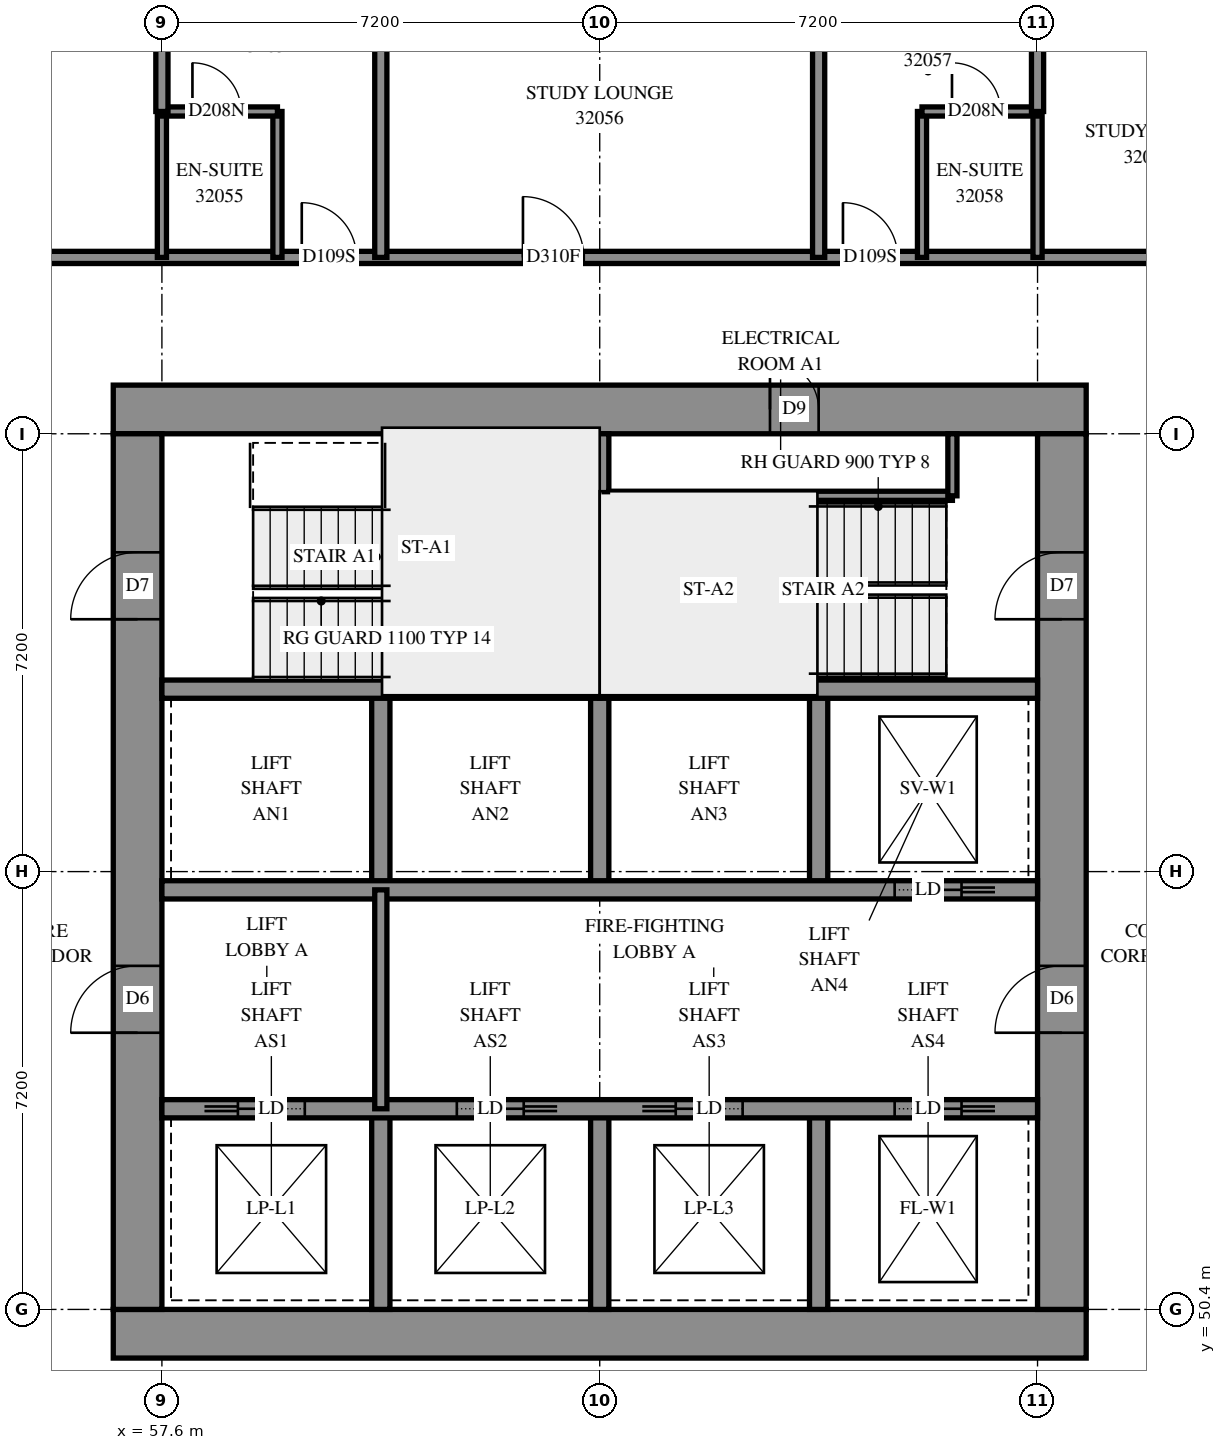
"""IFC4 building model, lengths in metres.
Left out: names, types, materials, properties, quantities, classifications, styles, units other than length and angle.
Written with IfcOpenShell. Run it as: python <this file> out.ifc"""

import sys

from ifc_helpers import new_model, si_unit, direction, frame, frame_2d, origin, place, context, subcontext, project, spatial, rectangle, extrude, element, fill, save


model = new_model("IFC4")
c1 = context("Model", 3, precision=1e-05, world=origin(), true_north=direction((0.0, 1.0)))
c2 = subcontext(c1, "Body", "Model", "MODEL_VIEW")
j1 = project(units=[si_unit("LENGTHUNIT", "METRE"), si_unit("PLANEANGLEUNIT", "RADIAN")], contexts=[c1])
p1 = place(None, origin())
s1 = spatial("IfcSite", under=j1, at=p1, CompositionType="ELEMENT")
p2 = place(p1, origin())
s2 = spatial("IfcBuilding", under=s1, at=p2, CompositionType="ELEMENT")
p3 = place(p2, frame((0.0, 0.0, 118.6)))
s3 = spatial("IfcBuildingStorey", under=s2, at=p3, CompositionType="ELEMENT", Elevation=118.6)
p4 = place(p3, frame((56.8, 50.0, -0.3), z_axis=(0.0, 0.0, 1.0), x_axis=(1.0, 0.0, 0.0)))
e1 = element("IfcWall", 1, at=p4, inside=s3, PredefinedType="SHEAR", context=c2, shape_type="SweptSolid", body=[
    extrude(rectangle(XDim=16.0, YDim=0.8, at=frame_2d((8.0, 0.0))), origin(), (0.0, 0.0, 1.0), 2.7),
])
p5 = place(p3, frame((56.8, 65.2, -0.3), z_axis=(0.0, 0.0, 1.0), x_axis=(1.0, 0.0, 0.0)))
e2 = element("IfcWall", 2, at=p5, inside=s3, PredefinedType="SHEAR", context=c2, shape_type="SweptSolid", body=[
    extrude(rectangle(XDim=16.0, YDim=0.8, at=frame_2d((8.0, 0.0))), origin(), (0.0, 0.0, 1.0), 2.7),
])
p6 = place(p5, frame((10.8, 0.0, 0.3)))
e3 = element("IfcOpeningElement", 3, at=p6, cuts=e2, PredefinedType="OPENING", context=c2, shape_type="SweptSolid", body=[
    extrude(rectangle(XDim=0.8, YDim=2.1, at=frame_2d((0.4, 1.05))), frame((0.0, 0.41, 0.0), z_axis=(0.0, -1.0, 0.0), x_axis=(1.0, 0.0, 0.0)), (0.0, 0.0, 1.0), 0.82),
])
p7 = place(p3, frame((57.2, 50.4, -0.3), z_axis=(0.0, 0.0, 1.0), x_axis=(0.0, 1.0, 0.0)))
e4 = element("IfcWall", 4, at=p7, inside=s3, PredefinedType="SHEAR", context=c2, shape_type="SweptSolid", body=[
    extrude(rectangle(XDim=14.4, YDim=0.8, at=frame_2d((7.2, 0.0))), origin(), (0.0, 0.0, 1.0), 2.7),
])
p8 = place(p7, frame((4.55, 0.0, 0.3)))
e5 = element("IfcOpeningElement", 5, at=p8, cuts=e4, PredefinedType="OPENING", context=c2, shape_type="SweptSolid", body=[
    extrude(rectangle(XDim=1.1, YDim=2.1, at=frame_2d((0.55, 1.05))), frame((0.0, 0.41, 0.0), z_axis=(0.0, -1.0, 0.0), x_axis=(1.0, 0.0, 0.0)), (0.0, 0.0, 1.0), 0.82),
])
p9 = place(p7, frame((11.35, 0.0, 0.3)))
e6 = element("IfcOpeningElement", 6, at=p9, cuts=e4, PredefinedType="OPENING", context=c2, shape_type="SweptSolid", body=[
    extrude(rectangle(XDim=1.1, YDim=2.1, at=frame_2d((0.55, 1.05))), frame((0.0, 0.41, 0.0), z_axis=(0.0, -1.0, 0.0), x_axis=(1.0, 0.0, 0.0)), (0.0, 0.0, 1.0), 0.82),
])
p10 = place(p3, frame((72.4, 50.4, -0.3), z_axis=(0.0, 0.0, 1.0), x_axis=(0.0, 1.0, 0.0)))
e7 = element("IfcWall", 7, at=p10, inside=s3, PredefinedType="SHEAR", context=c2, shape_type="SweptSolid", body=[
    extrude(rectangle(XDim=14.4, YDim=0.8, at=frame_2d((7.2, 0.0))), origin(), (0.0, 0.0, 1.0), 2.7),
])
p11 = place(p10, frame((4.55, 0.0, 0.3)))
e8 = element("IfcOpeningElement", 8, at=p11, cuts=e7, PredefinedType="OPENING", context=c2, shape_type="SweptSolid", body=[
    extrude(rectangle(XDim=1.1, YDim=2.1, at=frame_2d((0.55, 1.05))), frame((0.0, 0.41, 0.0), z_axis=(0.0, -1.0, 0.0), x_axis=(1.0, 0.0, 0.0)), (0.0, 0.0, 1.0), 0.82),
])
p12 = place(p10, frame((11.35, 0.0, 0.3)))
e9 = element("IfcOpeningElement", 9, at=p12, cuts=e7, PredefinedType="OPENING", context=c2, shape_type="SweptSolid", body=[
    extrude(rectangle(XDim=1.1, YDim=2.1, at=frame_2d((0.55, 1.05))), frame((0.0, 0.41, 0.0), z_axis=(0.0, -1.0, 0.0), x_axis=(1.0, 0.0, 0.0)), (0.0, 0.0, 1.0), 0.82),
])
for number, where, z_axis, x_axis in (
    (10, (61.2, 50.4, 0.0), (0.0, 0.0, 1.0), (0.0, 1.0, 0.0)),
    (11, (61.2, 57.3, 0.0), (0.0, 0.0, 1.0), (0.0, 1.0, 0.0)),
    (12, (64.8, 50.4, 0.0), (0.0, 0.0, 1.0), (0.0, 1.0, 0.0)),
    (13, (64.8, 57.3, 0.0), (0.0, 0.0, 1.0), (0.0, 1.0, 0.0)),
    (14, (68.4, 50.4, 0.0), (0.0, 0.0, 1.0), (0.0, 1.0, 0.0)),
    (15, (68.4, 57.3, 0.0), (0.0, 0.0, 1.0), (0.0, 1.0, 0.0)),
):
    element("IfcWall", number, at=place(p3, frame(where, z_axis=z_axis, x_axis=x_axis)), inside=s3, PredefinedType="SOLIDWALL", context=c2, shape_type="SweptSolid", body=[
        extrude(rectangle(XDim=3.3, YDim=0.3, at=frame_2d((1.65, 0.0))), origin(), (0.0, 0.0, 1.0), 3.1),
    ])
p13 = place(p3, frame((57.6, 53.7, 0.0), z_axis=(0.0, 0.0, 1.0), x_axis=(1.0, 0.0, 0.0)))
e16 = element("IfcWall", 16, at=p13, inside=s3, PredefinedType="SOLIDWALL", context=c2, shape_type="SweptSolid", body=[
    extrude(rectangle(XDim=14.4, YDim=0.3, at=frame_2d((7.2, 0.0))), origin(), (0.0, 0.0, 1.0), 3.1),
])
p14 = place(p13, frame((1.25, 0.0, 0.0)))
e17 = element("IfcOpeningElement", 17, at=p14, cuts=e16, PredefinedType="OPENING", context=c2, shape_type="SweptSolid", body=[
    extrude(rectangle(XDim=1.1, YDim=2.1, at=frame_2d((0.55, 1.05))), frame((0.0, 0.16, 0.0), z_axis=(0.0, -1.0, 0.0), x_axis=(1.0, 0.0, 0.0)), (0.0, 0.0, 1.0), 0.32),
])
p15 = place(p13, frame((4.85, 0.0, 0.0)))
e18 = element("IfcOpeningElement", 18, at=p15, cuts=e16, PredefinedType="OPENING", context=c2, shape_type="SweptSolid", body=[
    extrude(rectangle(XDim=1.1, YDim=2.1, at=frame_2d((0.55, 1.05))), frame((0.0, 0.16, 0.0), z_axis=(0.0, -1.0, 0.0), x_axis=(1.0, 0.0, 0.0)), (0.0, 0.0, 1.0), 0.32),
])
p16 = place(p13, frame((8.45, 0.0, 0.0)))
e19 = element("IfcOpeningElement", 19, at=p16, cuts=e16, PredefinedType="OPENING", context=c2, shape_type="SweptSolid", body=[
    extrude(rectangle(XDim=1.1, YDim=2.1, at=frame_2d((0.55, 1.05))), frame((0.0, 0.16, 0.0), z_axis=(0.0, -1.0, 0.0), x_axis=(1.0, 0.0, 0.0)), (0.0, 0.0, 1.0), 0.32),
])
p17 = place(p13, frame((12.05, 0.0, 0.0)))
e20 = element("IfcOpeningElement", 20, at=p17, cuts=e16, PredefinedType="OPENING", context=c2, shape_type="SweptSolid", body=[
    extrude(rectangle(XDim=1.1, YDim=2.1, at=frame_2d((0.55, 1.05))), frame((0.0, 0.16, 0.0), z_axis=(0.0, -1.0, 0.0), x_axis=(1.0, 0.0, 0.0)), (0.0, 0.0, 1.0), 0.32),
])
p18 = place(p3, frame((57.6, 57.3, 0.0), z_axis=(0.0, 0.0, 1.0), x_axis=(1.0, 0.0, 0.0)))
e21 = element("IfcWall", 21, at=p18, inside=s3, PredefinedType="SOLIDWALL", context=c2, shape_type="SweptSolid", body=[
    extrude(rectangle(XDim=14.4, YDim=0.3, at=frame_2d((7.2, 0.0))), origin(), (0.0, 0.0, 1.0), 3.1),
])
p19 = place(p18, frame((12.05, 0.0, 0.0)))
e22 = element("IfcOpeningElement", 22, at=p19, cuts=e21, PredefinedType="OPENING", context=c2, shape_type="SweptSolid", body=[
    extrude(rectangle(XDim=1.1, YDim=2.1, at=frame_2d((0.55, 1.05))), frame((0.0, 0.16, 0.0), z_axis=(0.0, -1.0, 0.0), x_axis=(1.0, 0.0, 0.0)), (0.0, 0.0, 1.0), 0.32),
])
for number, where, z_axis, x_axis in (
    (23, (57.6, 60.6, 0.0), (0.0, 0.0, 1.0), (1.0, 0.0, 0.0)),
    (24, (64.8, 60.6, 0.0), (0.0, 0.0, 1.0), (1.0, 0.0, 0.0)),
):
    element("IfcWall", number, at=place(p3, frame(where, z_axis=z_axis, x_axis=x_axis)), inside=s3, PredefinedType="SOLIDWALL", context=c2, shape_type="SweptSolid", body=[
        extrude(rectangle(XDim=7.2, YDim=0.3, at=frame_2d((3.6, 0.0))), origin(), (0.0, 0.0, 1.0), 3.1),
    ])
p20 = place(p3, frame((64.8, 60.6, 0.0), z_axis=(0.0, 0.0, 1.0), x_axis=(0.0, 1.0, 0.0)))
e25 = element("IfcWall", 25, at=p20, inside=s3, PredefinedType="SOLIDWALL", context=c2, shape_type="SweptSolid", body=[
    extrude(rectangle(XDim=4.2, YDim=0.3, at=frame_2d((2.1, 0.0))), origin(), (0.0, 0.0, 1.0), 3.1),
])
p21 = place(p3, frame((64.95, 63.78, 0.0), z_axis=(0.0, 0.0, 1.0), x_axis=(1.0, 0.0, 0.0)))
e26 = element("IfcWall", 26, at=p21, inside=s3, PredefinedType="PARTITIONING", context=c2, shape_type="SweptSolid", body=[
    extrude(rectangle(XDim=5.65, YDim=0.15, at=frame_2d((2.825, 0.0))), origin(), (0.0, 0.0, 1.0), 3.1),
])
p22 = place(p3, frame((70.6, 63.78, 0.0), z_axis=(0.0, 0.0, 1.0), x_axis=(0.0, 1.0, 0.0)))
e27 = element("IfcWall", 27, at=p22, inside=s3, PredefinedType="PARTITIONING", context=c2, shape_type="SweptSolid", body=[
    extrude(rectangle(XDim=1.02, YDim=0.15, at=frame_2d((0.51, 0.0))), origin(), (0.0, 0.0, 1.0), 3.1),
])
p23 = place(p3, frame((61.2, 53.7, 0.0), z_axis=(0.0, 0.0, 1.0), x_axis=(0.0, 1.0, 0.0)))
e28 = element("IfcWall", 28, at=p23, inside=s3, PredefinedType="PARTITIONING", context=c2, shape_type="SweptSolid", body=[
    extrude(rectangle(XDim=3.6, YDim=0.2, at=frame_2d((1.8, 0.0))), origin(), (0.0, 0.0, 1.0), 3.1),
])
p24 = place(p3, frame((54.7, 67.7, 0.0), z_axis=(0.0, 0.0, 1.0), x_axis=(1.0, 0.0, 0.0)))
e29 = element("IfcWall", 29, at=p24, inside=s3, PredefinedType="PARTITIONING", context=c2, shape_type="SweptSolid", body=[
    extrude(rectangle(XDim=20.2, YDim=0.2, at=frame_2d((10.1, 0.0))), origin(), (0.0, 0.0, 1.0), 3.1),
])
p25 = place(p24, frame((5.2, 0.0, 0.0)))
e30 = element("IfcOpeningElement", 30, at=p25, cuts=e29, PredefinedType="OPENING", context=c2, shape_type="SweptSolid", body=[
    extrude(rectangle(XDim=0.9, YDim=2.1, at=frame_2d((0.45, 1.05))), frame((0.0, 0.11, 0.0), z_axis=(0.0, -1.0, 0.0), x_axis=(1.0, 0.0, 0.0)), (0.0, 0.0, 1.0), 0.22),
])
p26 = place(p24, frame((8.838, 0.0, 0.0)))
e31 = element("IfcOpeningElement", 31, at=p26, cuts=e29, PredefinedType="OPENING", context=c2, shape_type="SweptSolid", body=[
    extrude(rectangle(XDim=1.0, YDim=2.1, at=frame_2d((0.5, 1.05))), frame((0.0, 0.11, 0.0), z_axis=(0.0, -1.0, 0.0), x_axis=(1.0, 0.0, 0.0)), (0.0, 0.0, 1.0), 0.22),
])
p27 = place(p24, frame((14.1, 0.0, 0.0)))
e32 = element("IfcOpeningElement", 32, at=p27, cuts=e29, PredefinedType="OPENING", context=c2, shape_type="SweptSolid", body=[
    extrude(rectangle(XDim=0.9, YDim=2.1, at=frame_2d((0.45, 1.05))), frame((0.0, 0.11, 0.0), z_axis=(0.0, -1.0, 0.0), x_axis=(1.0, 0.0, 0.0)), (0.0, 0.0, 1.0), 0.22),
])
p28 = place(p3, frame((68.4, 67.7, 0.0), z_axis=(0.0, 0.0, 1.0), x_axis=(0.0, 1.0, 0.0)))
e33 = element("IfcWall", 33, at=p28, inside=s3, PredefinedType="PARTITIONING", context=c2, shape_type="SweptSolid", body=[
    extrude(rectangle(XDim=5.002, YDim=0.2, at=frame_2d((2.501, 0.0))), origin(), (0.0, 0.0, 1.0), 3.1),
])
p29 = place(p3, frame((61.2, 67.7, 0.0), z_axis=(0.0, 0.0, 1.0), x_axis=(0.0, 1.0, 0.0)))
e34 = element("IfcWall", 34, at=p29, inside=s3, PredefinedType="PARTITIONING", context=c2, shape_type="SweptSolid", body=[
    extrude(rectangle(XDim=4.954, YDim=0.2, at=frame_2d((2.477, 0.0))), origin(), (0.0, 0.0, 1.0), 3.1),
])
for number, where, z_axis, x_axis in (
    (35, (59.5, 67.7, 0.0), (0.0, 0.0, 1.0), (0.0, 1.0, 0.0)),
    (36, (57.6, 67.7, 0.0), (0.0, 0.0, 1.0), (0.0, 1.0, 0.0)),
    (37, (70.1, 67.7, 0.0), (0.0, 0.0, 1.0), (0.0, 1.0, 0.0)),
    (38, (72.0, 67.7, 0.0), (0.0, 0.0, 1.0), (0.0, 1.0, 0.0)),
):
    element("IfcWall", number, at=place(p3, frame(where, z_axis=z_axis, x_axis=x_axis)), inside=s3, PredefinedType="PARTITIONING", context=c2, shape_type="SweptSolid", body=[
        extrude(rectangle(XDim=2.4, YDim=0.15, at=frame_2d((1.2, 0.0))), origin(), (0.0, 0.0, 1.0), 3.1),
    ])
p30 = place(p3, frame((70.1, 70.1, 0.0), z_axis=(0.0, 0.0, 1.0), x_axis=(1.0, 0.0, 0.0)))
e39 = element("IfcWall", 39, at=p30, inside=s3, PredefinedType="PARTITIONING", context=c2, shape_type="SweptSolid", body=[
    extrude(rectangle(XDim=1.9, YDim=0.15, at=frame_2d((0.95, 0.0))), origin(), (0.0, 0.0, 1.0), 3.1),
])
p31 = place(p30, frame((0.493, 0.0, 0.0)))
e40 = element("IfcOpeningElement", 40, at=p31, cuts=e39, PredefinedType="OPENING", context=c2, shape_type="SweptSolid", body=[
    extrude(rectangle(XDim=0.8, YDim=2.1, at=frame_2d((0.4, 1.05))), frame((0.0, 0.085, 0.0), z_axis=(0.0, -1.0, 0.0), x_axis=(1.0, 0.0, 0.0)), (0.0, 0.0, 1.0), 0.17),
])
p32 = place(p3, frame((57.6, 70.1, 0.0), z_axis=(0.0, 0.0, 1.0), x_axis=(1.0, 0.0, 0.0)))
e41 = element("IfcWall", 41, at=p32, inside=s3, PredefinedType="PARTITIONING", context=c2, shape_type="SweptSolid", body=[
    extrude(rectangle(XDim=1.9, YDim=0.15, at=frame_2d((0.95, 0.0))), origin(), (0.0, 0.0, 1.0), 3.1),
])
p33 = place(p32, frame((0.502, 0.0, 0.0)))
e42 = element("IfcOpeningElement", 42, at=p33, cuts=e41, PredefinedType="OPENING", context=c2, shape_type="SweptSolid", body=[
    extrude(rectangle(XDim=0.8, YDim=2.1, at=frame_2d((0.4, 1.05))), frame((0.0, 0.085, 0.0), z_axis=(0.0, -1.0, 0.0), x_axis=(1.0, 0.0, 0.0)), (0.0, 0.0, 1.0), 0.17),
])
p34 = place(p3, frame((57.6, 70.1, 0.0), z_axis=(0.0, 0.0, 1.0), x_axis=(0.0, 1.0, 0.0)))
e43 = element("IfcWall", 43, at=p34, inside=s3, PredefinedType="PARTITIONING", context=c2, shape_type="SweptSolid", body=[
    extrude(rectangle(XDim=1.4, YDim=0.2, at=frame_2d((0.7, 0.0))), origin(), (0.0, 0.0, 1.0), 3.1),
])
p35 = place(p3, frame((72.0, 70.1, 0.0), z_axis=(0.0, 0.0, 1.0), x_axis=(0.0, 1.0, 0.0)))
e44 = element("IfcWall", 44, at=p35, inside=s3, PredefinedType="PARTITIONING", context=c2, shape_type="SweptSolid", body=[
    extrude(rectangle(XDim=1.296, YDim=0.2, at=frame_2d((0.648, 0.0))), origin(), (0.0, 0.0, 1.0), 3.1),
])
p36 = place(p6, origin())
e45 = element("IfcDoor", 45, at=p36, inside=s3, OperationType="SINGLE_SWING_RIGHT", PredefinedType="DOOR", context=c2, shape_type="SweptSolid", body=[
    extrude(rectangle(XDim=0.8, YDim=2.1, at=frame_2d((0.4, 1.05))), frame((0.0, -0.34, 0.0), z_axis=(0.0, -1.0, 0.0), x_axis=(1.0, 0.0, 0.0)), (0.0, 0.0, 1.0), 0.05),
])
fill(e3, e45)
p37 = place(p8, origin())
e46 = element("IfcDoor", 46, at=p37, inside=s3, OperationType="DOUBLE_DOOR_SINGLE_SWING", PredefinedType="DOOR", context=c2, shape_type="SweptSolid", body=[
    extrude(rectangle(XDim=1.1, YDim=2.1, at=frame_2d((0.55, 1.05))), frame((0.0, 0.025, 0.0), z_axis=(0.0, -1.0, 0.0), x_axis=(1.0, 0.0, 0.0)), (0.0, 0.0, 1.0), 0.05),
])
fill(e5, e46)
p38 = place(p11, origin())
e47 = element("IfcDoor", 47, at=p38, inside=s3, OperationType="DOUBLE_DOOR_SINGLE_SWING", PredefinedType="DOOR", context=c2, shape_type="SweptSolid", body=[
    extrude(rectangle(XDim=1.1, YDim=2.1, at=frame_2d((0.55, 1.05))), frame((0.0, 0.025, 0.0), z_axis=(0.0, -1.0, 0.0), x_axis=(1.0, 0.0, 0.0)), (0.0, 0.0, 1.0), 0.05),
])
fill(e8, e47)
p39 = place(p9, origin())
e48 = element("IfcDoor", 48, at=p39, inside=s3, OperationType="SINGLE_SWING_LEFT", PredefinedType="DOOR", context=c2, shape_type="SweptSolid", body=[
    extrude(rectangle(XDim=1.1, YDim=2.1, at=frame_2d((0.55, 1.05))), frame((0.0, 0.025, 0.0), z_axis=(0.0, -1.0, 0.0), x_axis=(1.0, 0.0, 0.0)), (0.0, 0.0, 1.0), 0.05),
])
fill(e6, e48)
p40 = place(p12, origin())
e49 = element("IfcDoor", 49, at=p40, inside=s3, OperationType="SINGLE_SWING_RIGHT", PredefinedType="DOOR", context=c2, shape_type="SweptSolid", body=[
    extrude(rectangle(XDim=1.1, YDim=2.1, at=frame_2d((0.55, 1.05))), frame((0.0, 0.025, 0.0), z_axis=(0.0, -1.0, 0.0), x_axis=(1.0, 0.0, 0.0)), (0.0, 0.0, 1.0), 0.05),
])
fill(e9, e49)
p41 = place(p14, origin())
e50 = element("IfcDoor", 50, at=p41, inside=s3, OperationType="SLIDING_TO_LEFT", PredefinedType="DOOR", context=c2, shape_type="SweptSolid", body=[
    extrude(rectangle(XDim=1.1, YDim=2.1, at=frame_2d((0.55, 1.05))), frame((0.0, 0.025, 0.0), z_axis=(0.0, -1.0, 0.0), x_axis=(1.0, 0.0, 0.0)), (0.0, 0.0, 1.0), 0.05),
])
fill(e17, e50)
p42 = place(p15, origin())
e51 = element("IfcDoor", 51, at=p42, inside=s3, OperationType="SLIDING_TO_RIGHT", PredefinedType="DOOR", context=c2, shape_type="SweptSolid", body=[
    extrude(rectangle(XDim=1.1, YDim=2.1, at=frame_2d((0.55, 1.05))), frame((0.0, 0.025, 0.0), z_axis=(0.0, -1.0, 0.0), x_axis=(1.0, 0.0, 0.0)), (0.0, 0.0, 1.0), 0.05),
])
fill(e18, e51)
p43 = place(p16, origin())
e52 = element("IfcDoor", 52, at=p43, inside=s3, OperationType="SLIDING_TO_LEFT", PredefinedType="DOOR", context=c2, shape_type="SweptSolid", body=[
    extrude(rectangle(XDim=1.1, YDim=2.1, at=frame_2d((0.55, 1.05))), frame((0.0, 0.025, 0.0), z_axis=(0.0, -1.0, 0.0), x_axis=(1.0, 0.0, 0.0)), (0.0, 0.0, 1.0), 0.05),
])
fill(e19, e52)
p44 = place(p17, origin())
e53 = element("IfcDoor", 53, at=p44, inside=s3, OperationType="SLIDING_TO_RIGHT", PredefinedType="DOOR", context=c2, shape_type="SweptSolid", body=[
    extrude(rectangle(XDim=1.1, YDim=2.1, at=frame_2d((0.55, 1.05))), frame((0.0, 0.025, 0.0), z_axis=(0.0, -1.0, 0.0), x_axis=(1.0, 0.0, 0.0)), (0.0, 0.0, 1.0), 0.05),
])
fill(e20, e53)
p45 = place(p19, origin())
e54 = element("IfcDoor", 54, at=p45, inside=s3, OperationType="SLIDING_TO_RIGHT", PredefinedType="DOOR", context=c2, shape_type="SweptSolid", body=[
    extrude(rectangle(XDim=1.1, YDim=2.1, at=frame_2d((0.55, 1.05))), frame((0.0, 0.025, 0.0), z_axis=(0.0, -1.0, 0.0), x_axis=(1.0, 0.0, 0.0)), (0.0, 0.0, 1.0), 0.05),
])
fill(e22, e54)
p46 = place(p25, origin())
e55 = element("IfcDoor", 55, at=p46, inside=s3, OperationType="SINGLE_SWING_RIGHT", PredefinedType="DOOR", context=c2, shape_type="SweptSolid", body=[
    extrude(rectangle(XDim=0.9, YDim=2.1, at=frame_2d((0.45, 1.05))), frame((0.0, 0.025, 0.0), z_axis=(0.0, -1.0, 0.0), x_axis=(1.0, 0.0, 0.0)), (0.0, 0.0, 1.0), 0.05),
])
fill(e30, e55)
p47 = place(p33, origin())
e56 = element("IfcDoor", 56, at=p47, inside=s3, OperationType="SINGLE_SWING_RIGHT", PredefinedType="DOOR", context=c2, shape_type="SweptSolid", body=[
    extrude(rectangle(XDim=0.8, YDim=2.1, at=frame_2d((0.4, 1.05))), frame((0.0, 0.025, 0.0), z_axis=(0.0, -1.0, 0.0), x_axis=(1.0, 0.0, 0.0)), (0.0, 0.0, 1.0), 0.05),
])
fill(e42, e56)
p48 = place(p26, origin())
e57 = element("IfcDoor", 57, at=p48, inside=s3, OperationType="SINGLE_SWING_LEFT", PredefinedType="DOOR", context=c2, shape_type="SweptSolid", body=[
    extrude(rectangle(XDim=1.0, YDim=2.1, at=frame_2d((0.5, 1.05))), frame((0.0, 0.025, 0.0), z_axis=(0.0, -1.0, 0.0), x_axis=(1.0, 0.0, 0.0)), (0.0, 0.0, 1.0), 0.05),
])
fill(e31, e57)
p49 = place(p27, origin())
e58 = element("IfcDoor", 58, at=p49, inside=s3, OperationType="SINGLE_SWING_LEFT", PredefinedType="DOOR", context=c2, shape_type="SweptSolid", body=[
    extrude(rectangle(XDim=0.9, YDim=2.1, at=frame_2d((0.45, 1.05))), frame((0.0, 0.025, 0.0), z_axis=(0.0, -1.0, 0.0), x_axis=(1.0, 0.0, 0.0)), (0.0, 0.0, 1.0), 0.05),
])
fill(e32, e58)
p50 = place(p31, origin())
e59 = element("IfcDoor", 59, at=p50, inside=s3, OperationType="SINGLE_SWING_RIGHT", PredefinedType="DOOR", context=c2, shape_type="SweptSolid", body=[
    extrude(rectangle(XDim=0.8, YDim=2.1, at=frame_2d((0.4, 1.05))), frame((0.0, 0.025, 0.0), z_axis=(0.0, -1.0, 0.0), x_axis=(1.0, 0.0, 0.0)), (0.0, 0.0, 1.0), 0.05),
])
fill(e40, e59)
save(model, sys.argv[1])
